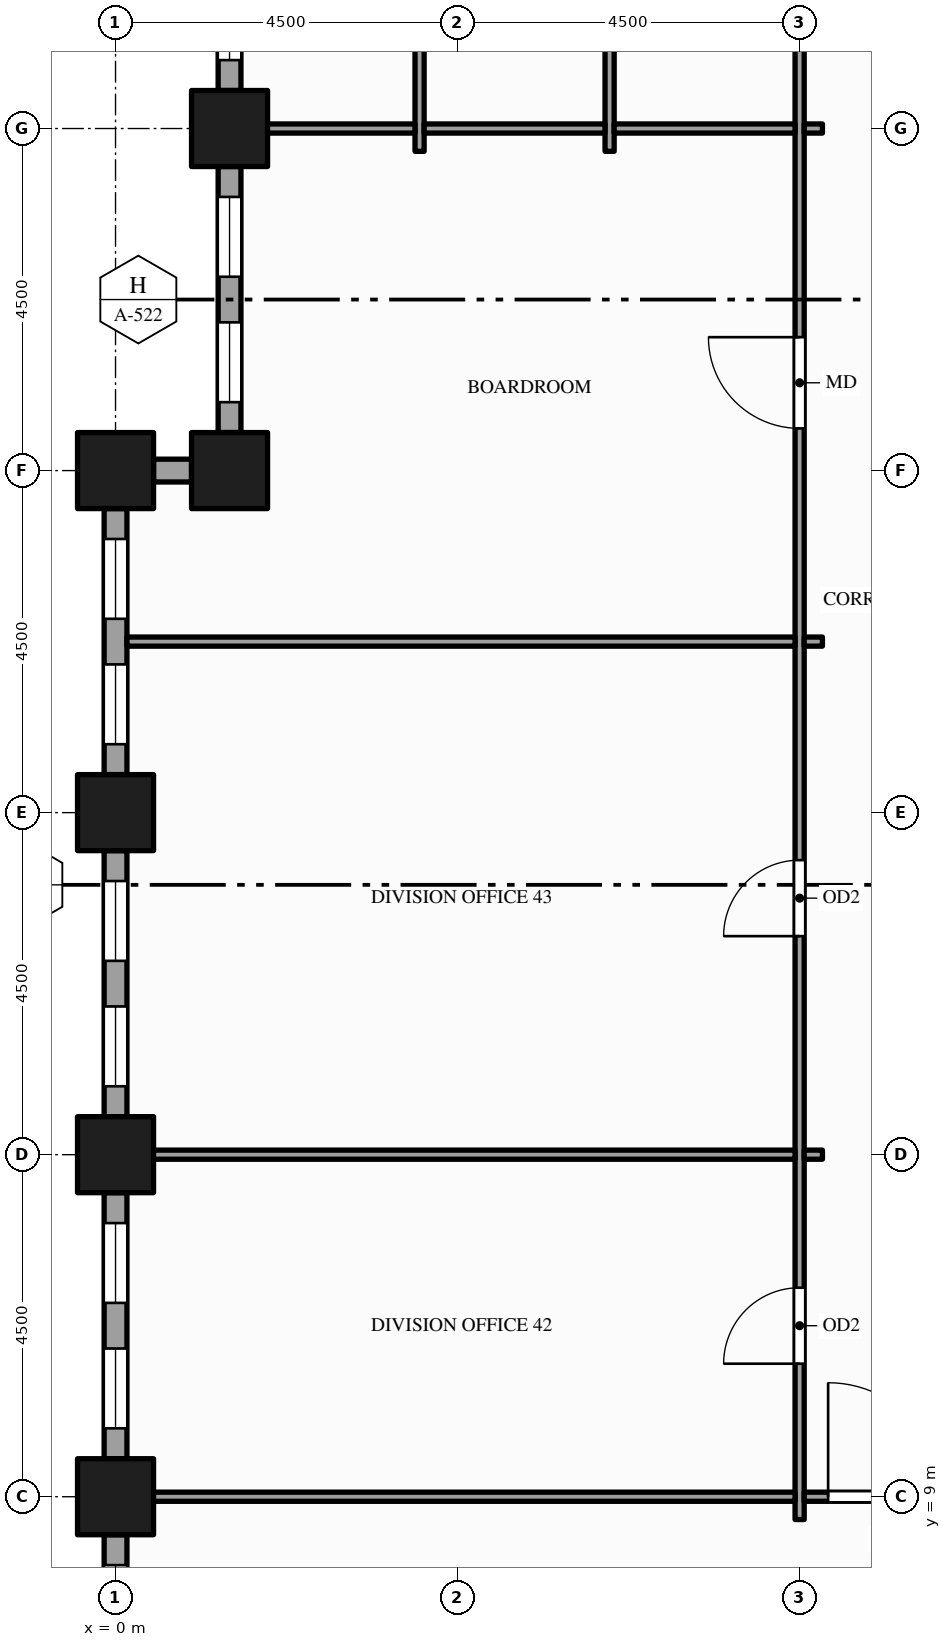
"""IFC4 building model, lengths in metres.
Left out: names, types, materials, properties, quantities, classifications, styles, units other than length and angle.
Written with IfcOpenShell. Run it as: python <this file> out.ifc"""

import sys

from ifc_helpers import new_model, si_unit, direction, frame, frame_2d, origin, origin_2d, place, context, subcontext, project, spatial, rectangle, hollow_rectangle, extrude, element, fill, save


model = new_model("IFC4")
c1 = context("Model", 3, precision=1e-05, world=origin(), true_north=direction((0.0, 1.0)))
c2 = subcontext(c1, "Body", "Model", "MODEL_VIEW")
j1 = project(units=[si_unit("LENGTHUNIT", "METRE"), si_unit("PLANEANGLEUNIT", "RADIAN")], contexts=[c1])
p1 = place(None, origin())
s1 = spatial("IfcSite", under=j1, at=p1, CompositionType="ELEMENT")
p2 = place(p1, origin())
s2 = spatial("IfcBuilding", under=s1, at=p2, CompositionType="ELEMENT")
p3 = place(p2, frame((0.0, 0.0, 107.0)))
s3 = spatial("IfcBuildingStorey", under=s2, at=p3, CompositionType="ELEMENT", Elevation=107.0)
for number, where, z_axis, x_axis in (
    (1, (0.0, 9.0, -0.15), (0.0, 0.0, 1.0), (1.0, 0.0, 0.0)),
    (2, (0.0, 13.5, -0.15), (0.0, 0.0, 1.0), (1.0, 0.0, 0.0)),
    (3, (0.0, 18.0, -0.15), (0.0, 0.0, 1.0), (1.0, 0.0, 0.0)),
    (4, (0.0, 22.5, -0.15), (0.0, 0.0, 1.0), (1.0, 0.0, 0.0)),
    (5, (1.5, 22.5, -0.15), (0.0, 0.0, 1.0), (1.0, 0.0, 0.0)),
    (6, (1.5, 27.0, -0.15), (0.0, 0.0, 1.0), (1.0, 0.0, 0.0)),
):
    element("IfcColumn", number, at=place(p3, frame(where, z_axis=z_axis, x_axis=x_axis)), inside=s3, PredefinedType="COLUMN", context=c2, shape_type="SweptSolid", body=[
        extrude(hollow_rectangle(XDim=1.0, YDim=1.0, WallThickness=0.05, at=origin_2d()), origin(), (0.0, 0.0, 1.0), 4.0),
    ])
p4 = place(p3, frame((1.5, 31.0, 0.0), z_axis=(0.0, 0.0, 1.0), x_axis=(0.0, -1.0, 0.0)))
e7 = element("IfcWall", 7, at=p4, inside=s3, PredefinedType="STANDARD", context=c2, shape_type="SweptSolid", body=[
    extrude(rectangle(XDim=3.5, YDim=0.3, at=frame_2d((1.75, 0.0))), origin(), (0.0, 0.0, 1.0), 3.154),
])
p5 = place(p4, frame((0.4, 0.0, 0.9)))
e8 = element("IfcOpeningElement", 8, at=p5, cuts=e7, PredefinedType="OPENING", context=c2, shape_type="SweptSolid", body=[
    extrude(rectangle(XDim=1.05, YDim=2.0, at=frame_2d((0.525, 1.0))), frame((0.0, 0.16, 0.0), z_axis=(0.0, -1.0, 0.0), x_axis=(1.0, 0.0, 0.0)), (0.0, 0.0, 1.0), 0.32),
])
p6 = place(p4, frame((2.05, 0.0, 0.9)))
e9 = element("IfcOpeningElement", 9, at=p6, cuts=e7, PredefinedType="OPENING", context=c2, shape_type="SweptSolid", body=[
    extrude(rectangle(XDim=1.05, YDim=2.0, at=frame_2d((0.525, 1.0))), frame((0.0, 0.16, 0.0), z_axis=(0.0, -1.0, 0.0), x_axis=(1.0, 0.0, 0.0)), (0.0, 0.0, 1.0), 0.32),
])
p7 = place(p3, frame((1.5, 26.5, 0.0), z_axis=(0.0, 0.0, 1.0), x_axis=(0.0, -1.0, 0.0)))
e10 = element("IfcWall", 10, at=p7, inside=s3, PredefinedType="STANDARD", context=c2, shape_type="SweptSolid", body=[
    extrude(rectangle(XDim=3.5, YDim=0.3, at=frame_2d((1.75, 0.0))), origin(), (0.0, 0.0, 1.0), 3.154),
])
p8 = place(p7, frame((0.4, 0.0, 0.9)))
e11 = element("IfcOpeningElement", 11, at=p8, cuts=e10, PredefinedType="OPENING", context=c2, shape_type="SweptSolid", body=[
    extrude(rectangle(XDim=1.05, YDim=2.0, at=frame_2d((0.525, 1.0))), frame((0.0, 0.16, 0.0), z_axis=(0.0, -1.0, 0.0), x_axis=(1.0, 0.0, 0.0)), (0.0, 0.0, 1.0), 0.32),
])
p9 = place(p7, frame((2.05, 0.0, 0.9)))
e12 = element("IfcOpeningElement", 12, at=p9, cuts=e10, PredefinedType="OPENING", context=c2, shape_type="SweptSolid", body=[
    extrude(rectangle(XDim=1.05, YDim=2.0, at=frame_2d((0.525, 1.0))), frame((0.0, 0.16, 0.0), z_axis=(0.0, -1.0, 0.0), x_axis=(1.0, 0.0, 0.0)), (0.0, 0.0, 1.0), 0.32),
])
p10 = place(p3, frame((1.0, 22.5, 0.0), z_axis=(0.0, 0.0, 1.0), x_axis=(-1.0, 0.0, 0.0)))
e13 = element("IfcWall", 13, at=p10, inside=s3, PredefinedType="STANDARD", context=c2, shape_type="SweptSolid", body=[
    extrude(rectangle(XDim=0.5, YDim=0.3, at=frame_2d((0.25, 0.0))), origin(), (0.0, 0.0, 1.0), 3.154),
])
p11 = place(p3, frame((0.0, 22.0, 0.0), z_axis=(0.0, 0.0, 1.0), x_axis=(0.0, -1.0, 0.0)))
e14 = element("IfcWall", 14, at=p11, inside=s3, PredefinedType="STANDARD", context=c2, shape_type="SweptSolid", body=[
    extrude(rectangle(XDim=3.5, YDim=0.3, at=frame_2d((1.75, 0.0))), origin(), (0.0, 0.0, 1.0), 3.154),
])
p12 = place(p11, frame((0.4, 0.0, 0.9)))
e15 = element("IfcOpeningElement", 15, at=p12, cuts=e14, PredefinedType="OPENING", context=c2, shape_type="SweptSolid", body=[
    extrude(rectangle(XDim=1.05, YDim=2.0, at=frame_2d((0.525, 1.0))), frame((0.0, 0.16, 0.0), z_axis=(0.0, -1.0, 0.0), x_axis=(1.0, 0.0, 0.0)), (0.0, 0.0, 1.0), 0.32),
])
p13 = place(p11, frame((2.05, 0.0, 0.9)))
e16 = element("IfcOpeningElement", 16, at=p13, cuts=e14, PredefinedType="OPENING", context=c2, shape_type="SweptSolid", body=[
    extrude(rectangle(XDim=1.05, YDim=2.0, at=frame_2d((0.525, 1.0))), frame((0.0, 0.16, 0.0), z_axis=(0.0, -1.0, 0.0), x_axis=(1.0, 0.0, 0.0)), (0.0, 0.0, 1.0), 0.32),
])
p14 = place(p3, frame((0.0, 17.5, 0.0), z_axis=(0.0, 0.0, 1.0), x_axis=(0.0, -1.0, 0.0)))
e17 = element("IfcWall", 17, at=p14, inside=s3, PredefinedType="STANDARD", context=c2, shape_type="SweptSolid", body=[
    extrude(rectangle(XDim=3.5, YDim=0.3, at=frame_2d((1.75, 0.0))), origin(), (0.0, 0.0, 1.0), 3.154),
])
p15 = place(p14, frame((0.4, 0.0, 0.9)))
e18 = element("IfcOpeningElement", 18, at=p15, cuts=e17, PredefinedType="OPENING", context=c2, shape_type="SweptSolid", body=[
    extrude(rectangle(XDim=1.05, YDim=2.0, at=frame_2d((0.525, 1.0))), frame((0.0, 0.16, 0.0), z_axis=(0.0, -1.0, 0.0), x_axis=(1.0, 0.0, 0.0)), (0.0, 0.0, 1.0), 0.32),
])
p16 = place(p14, frame((2.05, 0.0, 0.9)))
e19 = element("IfcOpeningElement", 19, at=p16, cuts=e17, PredefinedType="OPENING", context=c2, shape_type="SweptSolid", body=[
    extrude(rectangle(XDim=1.05, YDim=2.0, at=frame_2d((0.525, 1.0))), frame((0.0, 0.16, 0.0), z_axis=(0.0, -1.0, 0.0), x_axis=(1.0, 0.0, 0.0)), (0.0, 0.0, 1.0), 0.32),
])
p17 = place(p3, frame((0.0, 13.0, 0.0), z_axis=(0.0, 0.0, 1.0), x_axis=(0.0, -1.0, 0.0)))
e20 = element("IfcWall", 20, at=p17, inside=s3, PredefinedType="STANDARD", context=c2, shape_type="SweptSolid", body=[
    extrude(rectangle(XDim=3.5, YDim=0.3, at=frame_2d((1.75, 0.0))), origin(), (0.0, 0.0, 1.0), 3.154),
])
p18 = place(p17, frame((0.4, 0.0, 0.9)))
e21 = element("IfcOpeningElement", 21, at=p18, cuts=e20, PredefinedType="OPENING", context=c2, shape_type="SweptSolid", body=[
    extrude(rectangle(XDim=1.05, YDim=2.0, at=frame_2d((0.525, 1.0))), frame((0.0, 0.16, 0.0), z_axis=(0.0, -1.0, 0.0), x_axis=(1.0, 0.0, 0.0)), (0.0, 0.0, 1.0), 0.32),
])
p19 = place(p17, frame((2.05, 0.0, 0.9)))
e22 = element("IfcOpeningElement", 22, at=p19, cuts=e20, PredefinedType="OPENING", context=c2, shape_type="SweptSolid", body=[
    extrude(rectangle(XDim=1.05, YDim=2.0, at=frame_2d((0.525, 1.0))), frame((0.0, 0.16, 0.0), z_axis=(0.0, -1.0, 0.0), x_axis=(1.0, 0.0, 0.0)), (0.0, 0.0, 1.0), 0.32),
])
p20 = place(p3, frame((0.0, 8.5, 0.0), z_axis=(0.0, 0.0, 1.0), x_axis=(0.0, -1.0, 0.0)))
e23 = element("IfcWall", 23, at=p20, inside=s3, PredefinedType="STANDARD", context=c2, shape_type="SweptSolid", body=[
    extrude(rectangle(XDim=3.5, YDim=0.3, at=frame_2d((1.75, 0.0))), origin(), (0.0, 0.0, 1.0), 3.154),
])
p21 = place(p20, frame((0.4, 0.0, 0.9)))
e24 = element("IfcOpeningElement", 24, at=p21, cuts=e23, PredefinedType="OPENING", context=c2, shape_type="SweptSolid", body=[
    extrude(rectangle(XDim=1.05, YDim=2.0, at=frame_2d((0.525, 1.0))), frame((0.0, 0.16, 0.0), z_axis=(0.0, -1.0, 0.0), x_axis=(1.0, 0.0, 0.0)), (0.0, 0.0, 1.0), 0.32),
])
p22 = place(p20, frame((2.05, 0.0, 0.9)))
e25 = element("IfcOpeningElement", 25, at=p22, cuts=e23, PredefinedType="OPENING", context=c2, shape_type="SweptSolid", body=[
    extrude(rectangle(XDim=1.05, YDim=2.0, at=frame_2d((0.525, 1.0))), frame((0.0, 0.16, 0.0), z_axis=(0.0, -1.0, 0.0), x_axis=(1.0, 0.0, 0.0)), (0.0, 0.0, 1.0), 0.32),
])
for number, where, z_axis, x_axis in (
    (26, (4.0, 26.7, 0.0), (0.0, 0.0, 1.0), (0.0, 1.0, 0.0)),
    (27, (6.5, 26.7, 0.0), (0.0, 0.0, 1.0), (0.0, 1.0, 0.0)),
):
    element("IfcWall", number, at=place(p3, frame(where, z_axis=z_axis, x_axis=x_axis)), inside=s3, PredefinedType="PARTITIONING", context=c2, shape_type="SweptSolid", body=[
        extrude(rectangle(XDim=5.1, YDim=0.12, at=frame_2d((2.55, 0.0))), origin(), (0.0, 0.0, 1.0), 3.85),
    ])
p23 = place(p3, frame((9.0, 8.7, 0.0), z_axis=(0.0, 0.0, 1.0), x_axis=(0.0, 1.0, 0.0)))
e28 = element("IfcWall", 28, at=p23, inside=s3, PredefinedType="PARTITIONING", context=c2, shape_type="SweptSolid", body=[
    extrude(rectangle(XDim=23.1, YDim=0.12, at=frame_2d((11.55, 0.0))), origin(), (0.0, 0.0, 1.0), 2.6),
])
p24 = place(p23, frame((2.05, 0.0, 0.0)))
e29 = element("IfcOpeningElement", 29, at=p24, cuts=e28, PredefinedType="OPENING", context=c2, shape_type="SweptSolid", body=[
    extrude(rectangle(XDim=1.0, YDim=2.1, at=frame_2d((0.5, 1.05))), frame((0.0, 0.07, 0.0), z_axis=(0.0, -1.0, 0.0), x_axis=(1.0, 0.0, 0.0)), (0.0, 0.0, 1.0), 0.14),
])
p25 = place(p23, frame((7.675, 0.0, 0.0)))
e30 = element("IfcOpeningElement", 30, at=p25, cuts=e28, PredefinedType="OPENING", context=c2, shape_type="SweptSolid", body=[
    extrude(rectangle(XDim=1.0, YDim=2.1, at=frame_2d((0.5, 1.05))), frame((0.0, 0.07, 0.0), z_axis=(0.0, -1.0, 0.0), x_axis=(1.0, 0.0, 0.0)), (0.0, 0.0, 1.0), 0.14),
])
p26 = place(p23, frame((14.355, 0.0, 0.0)))
e31 = element("IfcOpeningElement", 31, at=p26, cuts=e28, PredefinedType="OPENING", context=c2, shape_type="SweptSolid", body=[
    extrude(rectangle(XDim=1.2, YDim=2.1, at=frame_2d((0.6, 1.05))), frame((0.0, 0.07, 0.0), z_axis=(0.0, -1.0, 0.0), x_axis=(1.0, 0.0, 0.0)), (0.0, 0.0, 1.0), 0.14),
])
p27 = place(p3, frame((0.15, 9.0, 0.0), z_axis=(0.0, 0.0, 1.0), x_axis=(1.0, 0.0, 0.0)))
e32 = element("IfcWall", 32, at=p27, inside=s3, PredefinedType="PARTITIONING", context=c2, shape_type="SweptSolid", body=[
    extrude(rectangle(XDim=8.79, YDim=0.12, at=frame_2d((4.395, 0.0))), origin(), (0.0, 0.0, 1.0), 2.938),
])
p28 = place(p3, frame((9.06, 9.0, 0.0), z_axis=(0.0, 0.0, 1.0), x_axis=(1.0, 0.0, 0.0)))
e33 = element("IfcWall", 33, at=p28, inside=s3, PredefinedType="PARTITIONING", context=c2, shape_type="SweptSolid", body=[
    extrude(rectangle(XDim=2.13, YDim=0.12, at=frame_2d((1.065, 0.0))), origin(), (0.0, 0.0, 1.0), 2.938),
])
p29 = place(p28, frame((0.315, 0.0, 0.0)))
e34 = element("IfcOpeningElement", 34, at=p29, cuts=e33, PredefinedType="OPENING", context=c2, shape_type="SweptSolid", body=[
    extrude(rectangle(XDim=1.5, YDim=2.1, at=frame_2d((0.75, 1.05))), frame((0.0, 0.07, 0.0), z_axis=(0.0, -1.0, 0.0), x_axis=(1.0, 0.0, 0.0)), (0.0, 0.0, 1.0), 0.14),
])
p30 = place(p3, frame((0.15, 13.5, 0.0), z_axis=(0.0, 0.0, 1.0), x_axis=(1.0, 0.0, 0.0)))
e35 = element("IfcWall", 35, at=p30, inside=s3, PredefinedType="PARTITIONING", context=c2, shape_type="SweptSolid", body=[
    extrude(rectangle(XDim=8.79, YDim=0.12, at=frame_2d((4.395, 0.0))), origin(), (0.0, 0.0, 1.0), 2.938),
])
p31 = place(p3, frame((9.06, 13.5, 0.0), z_axis=(0.0, 0.0, 1.0), x_axis=(1.0, 0.0, 0.0)))
e36 = element("IfcWall", 36, at=p31, inside=s3, PredefinedType="PARTITIONING", context=c2, shape_type="SweptSolid", body=[
    extrude(rectangle(XDim=0.24, YDim=0.12, at=frame_2d((0.12, 0.0))), origin(), (0.0, 0.0, 1.0), 2.938),
])
p32 = place(p3, frame((0.15, 20.25, 0.0), z_axis=(0.0, 0.0, 1.0), x_axis=(1.0, 0.0, 0.0)))
e37 = element("IfcWall", 37, at=p32, inside=s3, PredefinedType="PARTITIONING", context=c2, shape_type="SweptSolid", body=[
    extrude(rectangle(XDim=8.79, YDim=0.12, at=frame_2d((4.395, 0.0))), origin(), (0.0, 0.0, 1.0), 2.938),
])
p33 = place(p3, frame((9.06, 20.25, 0.0), z_axis=(0.0, 0.0, 1.0), x_axis=(1.0, 0.0, 0.0)))
e38 = element("IfcWall", 38, at=p33, inside=s3, PredefinedType="PARTITIONING", context=c2, shape_type="SweptSolid", body=[
    extrude(rectangle(XDim=0.24, YDim=0.12, at=frame_2d((0.12, 0.0))), origin(), (0.0, 0.0, 1.0), 2.938),
])
p34 = place(p3, frame((1.65, 27.0, 0.0), z_axis=(0.0, 0.0, 1.0), x_axis=(1.0, 0.0, 0.0)))
e39 = element("IfcWall", 39, at=p34, inside=s3, PredefinedType="PARTITIONING", context=c2, shape_type="SweptSolid", body=[
    extrude(rectangle(XDim=2.29, YDim=0.12, at=frame_2d((1.145, 0.0))), origin(), (0.0, 0.0, 1.0), 2.938),
])
for number, where, z_axis, x_axis in (
    (40, (4.06, 27.0, 0.0), (0.0, 0.0, 1.0), (1.0, 0.0, 0.0)),
    (41, (6.56, 27.0, 0.0), (0.0, 0.0, 1.0), (1.0, 0.0, 0.0)),
):
    element("IfcWall", number, at=place(p3, frame(where, z_axis=z_axis, x_axis=x_axis)), inside=s3, PredefinedType="PARTITIONING", context=c2, shape_type="SweptSolid", body=[
        extrude(rectangle(XDim=2.38, YDim=0.12, at=frame_2d((1.19, 0.0))), origin(), (0.0, 0.0, 1.0), 2.938),
    ])
p35 = place(p3, frame((9.06, 27.0, 0.0), z_axis=(0.0, 0.0, 1.0), x_axis=(1.0, 0.0, 0.0)))
e42 = element("IfcWall", 42, at=p35, inside=s3, PredefinedType="PARTITIONING", context=c2, shape_type="SweptSolid", body=[
    extrude(rectangle(XDim=0.24, YDim=0.12, at=frame_2d((0.12, 0.0))), origin(), (0.0, 0.0, 1.0), 2.938),
])
p36 = place(p6, origin())
e43 = element("IfcWindow", 43, at=p36, inside=s3, PartitioningType="SINGLE_PANEL", PredefinedType="WINDOW", context=c2, shape_type="SweptSolid", body=[
    extrude(rectangle(XDim=1.05, YDim=2.0, at=frame_2d((0.525, 1.0))), frame((0.0, 0.03, 0.0), z_axis=(0.0, -1.0, 0.0), x_axis=(1.0, 0.0, 0.0)), (0.0, 0.0, 1.0), 0.06),
])
fill(e9, e43)
p37 = place(p8, origin())
e44 = element("IfcWindow", 44, at=p37, inside=s3, PartitioningType="SINGLE_PANEL", PredefinedType="WINDOW", context=c2, shape_type="SweptSolid", body=[
    extrude(rectangle(XDim=1.05, YDim=2.0, at=frame_2d((0.525, 1.0))), frame((0.0, 0.03, 0.0), z_axis=(0.0, -1.0, 0.0), x_axis=(1.0, 0.0, 0.0)), (0.0, 0.0, 1.0), 0.06),
])
fill(e11, e44)
p38 = place(p9, origin())
e45 = element("IfcWindow", 45, at=p38, inside=s3, PartitioningType="SINGLE_PANEL", PredefinedType="WINDOW", context=c2, shape_type="SweptSolid", body=[
    extrude(rectangle(XDim=1.05, YDim=2.0, at=frame_2d((0.525, 1.0))), frame((0.0, 0.03, 0.0), z_axis=(0.0, -1.0, 0.0), x_axis=(1.0, 0.0, 0.0)), (0.0, 0.0, 1.0), 0.06),
])
fill(e12, e45)
p39 = place(p12, origin())
e46 = element("IfcWindow", 46, at=p39, inside=s3, PartitioningType="SINGLE_PANEL", PredefinedType="WINDOW", context=c2, shape_type="SweptSolid", body=[
    extrude(rectangle(XDim=1.05, YDim=2.0, at=frame_2d((0.525, 1.0))), frame((0.0, 0.03, 0.0), z_axis=(0.0, -1.0, 0.0), x_axis=(1.0, 0.0, 0.0)), (0.0, 0.0, 1.0), 0.06),
])
fill(e15, e46)
p40 = place(p13, origin())
e47 = element("IfcWindow", 47, at=p40, inside=s3, PartitioningType="SINGLE_PANEL", PredefinedType="WINDOW", context=c2, shape_type="SweptSolid", body=[
    extrude(rectangle(XDim=1.05, YDim=2.0, at=frame_2d((0.525, 1.0))), frame((0.0, 0.03, 0.0), z_axis=(0.0, -1.0, 0.0), x_axis=(1.0, 0.0, 0.0)), (0.0, 0.0, 1.0), 0.06),
])
fill(e16, e47)
p41 = place(p15, origin())
e48 = element("IfcWindow", 48, at=p41, inside=s3, PartitioningType="SINGLE_PANEL", PredefinedType="WINDOW", context=c2, shape_type="SweptSolid", body=[
    extrude(rectangle(XDim=1.05, YDim=2.0, at=frame_2d((0.525, 1.0))), frame((0.0, 0.03, 0.0), z_axis=(0.0, -1.0, 0.0), x_axis=(1.0, 0.0, 0.0)), (0.0, 0.0, 1.0), 0.06),
])
fill(e18, e48)
p42 = place(p16, origin())
e49 = element("IfcWindow", 49, at=p42, inside=s3, PartitioningType="SINGLE_PANEL", PredefinedType="WINDOW", context=c2, shape_type="SweptSolid", body=[
    extrude(rectangle(XDim=1.05, YDim=2.0, at=frame_2d((0.525, 1.0))), frame((0.0, 0.03, 0.0), z_axis=(0.0, -1.0, 0.0), x_axis=(1.0, 0.0, 0.0)), (0.0, 0.0, 1.0), 0.06),
])
fill(e19, e49)
p43 = place(p18, origin())
e50 = element("IfcWindow", 50, at=p43, inside=s3, PartitioningType="SINGLE_PANEL", PredefinedType="WINDOW", context=c2, shape_type="SweptSolid", body=[
    extrude(rectangle(XDim=1.05, YDim=2.0, at=frame_2d((0.525, 1.0))), frame((0.0, 0.03, 0.0), z_axis=(0.0, -1.0, 0.0), x_axis=(1.0, 0.0, 0.0)), (0.0, 0.0, 1.0), 0.06),
])
fill(e21, e50)
p44 = place(p19, origin())
e51 = element("IfcWindow", 51, at=p44, inside=s3, PartitioningType="SINGLE_PANEL", PredefinedType="WINDOW", context=c2, shape_type="SweptSolid", body=[
    extrude(rectangle(XDim=1.05, YDim=2.0, at=frame_2d((0.525, 1.0))), frame((0.0, 0.03, 0.0), z_axis=(0.0, -1.0, 0.0), x_axis=(1.0, 0.0, 0.0)), (0.0, 0.0, 1.0), 0.06),
])
fill(e22, e51)
p45 = place(p21, origin())
e52 = element("IfcWindow", 52, at=p45, inside=s3, PartitioningType="SINGLE_PANEL", PredefinedType="WINDOW", context=c2, shape_type="SweptSolid", body=[
    extrude(rectangle(XDim=1.05, YDim=2.0, at=frame_2d((0.525, 1.0))), frame((0.0, 0.03, 0.0), z_axis=(0.0, -1.0, 0.0), x_axis=(1.0, 0.0, 0.0)), (0.0, 0.0, 1.0), 0.06),
])
fill(e24, e52)
p46 = place(p29, origin())
e53 = element("IfcDoor", 53, at=p46, inside=s3, OperationType="SINGLE_SWING_LEFT", PredefinedType="DOOR", context=c2, shape_type="SweptSolid", body=[
    extrude(rectangle(XDim=1.5, YDim=2.1, at=frame_2d((0.75, 1.05))), frame((0.0, 0.025, 0.0), z_axis=(0.0, -1.0, 0.0), x_axis=(1.0, 0.0, 0.0)), (0.0, 0.0, 1.0), 0.05),
])
fill(e34, e53)
p47 = place(p24, origin())
e54 = element("IfcDoor", 54, at=p47, inside=s3, OperationType="SINGLE_SWING_LEFT", PredefinedType="DOOR", context=c2, shape_type="SweptSolid", body=[
    extrude(rectangle(XDim=1.0, YDim=2.1, at=frame_2d((0.5, 1.05))), frame((0.0, 0.025, 0.0), z_axis=(0.0, -1.0, 0.0), x_axis=(1.0, 0.0, 0.0)), (0.0, 0.0, 1.0), 0.05),
])
fill(e29, e54)
p48 = place(p25, origin())
e55 = element("IfcDoor", 55, at=p48, inside=s3, OperationType="SINGLE_SWING_LEFT", PredefinedType="DOOR", context=c2, shape_type="SweptSolid", body=[
    extrude(rectangle(XDim=1.0, YDim=2.1, at=frame_2d((0.5, 1.05))), frame((0.0, 0.025, 0.0), z_axis=(0.0, -1.0, 0.0), x_axis=(1.0, 0.0, 0.0)), (0.0, 0.0, 1.0), 0.05),
])
fill(e30, e55)
p49 = place(p26, origin())
e56 = element("IfcDoor", 56, at=p49, inside=s3, OperationType="SINGLE_SWING_RIGHT", PredefinedType="DOOR", context=c2, shape_type="SweptSolid", body=[
    extrude(rectangle(XDim=1.2, YDim=2.1, at=frame_2d((0.6, 1.05))), frame((0.0, 0.025, 0.0), z_axis=(0.0, -1.0, 0.0), x_axis=(1.0, 0.0, 0.0)), (0.0, 0.0, 1.0), 0.05),
])
fill(e31, e56)
save(model, sys.argv[1])
